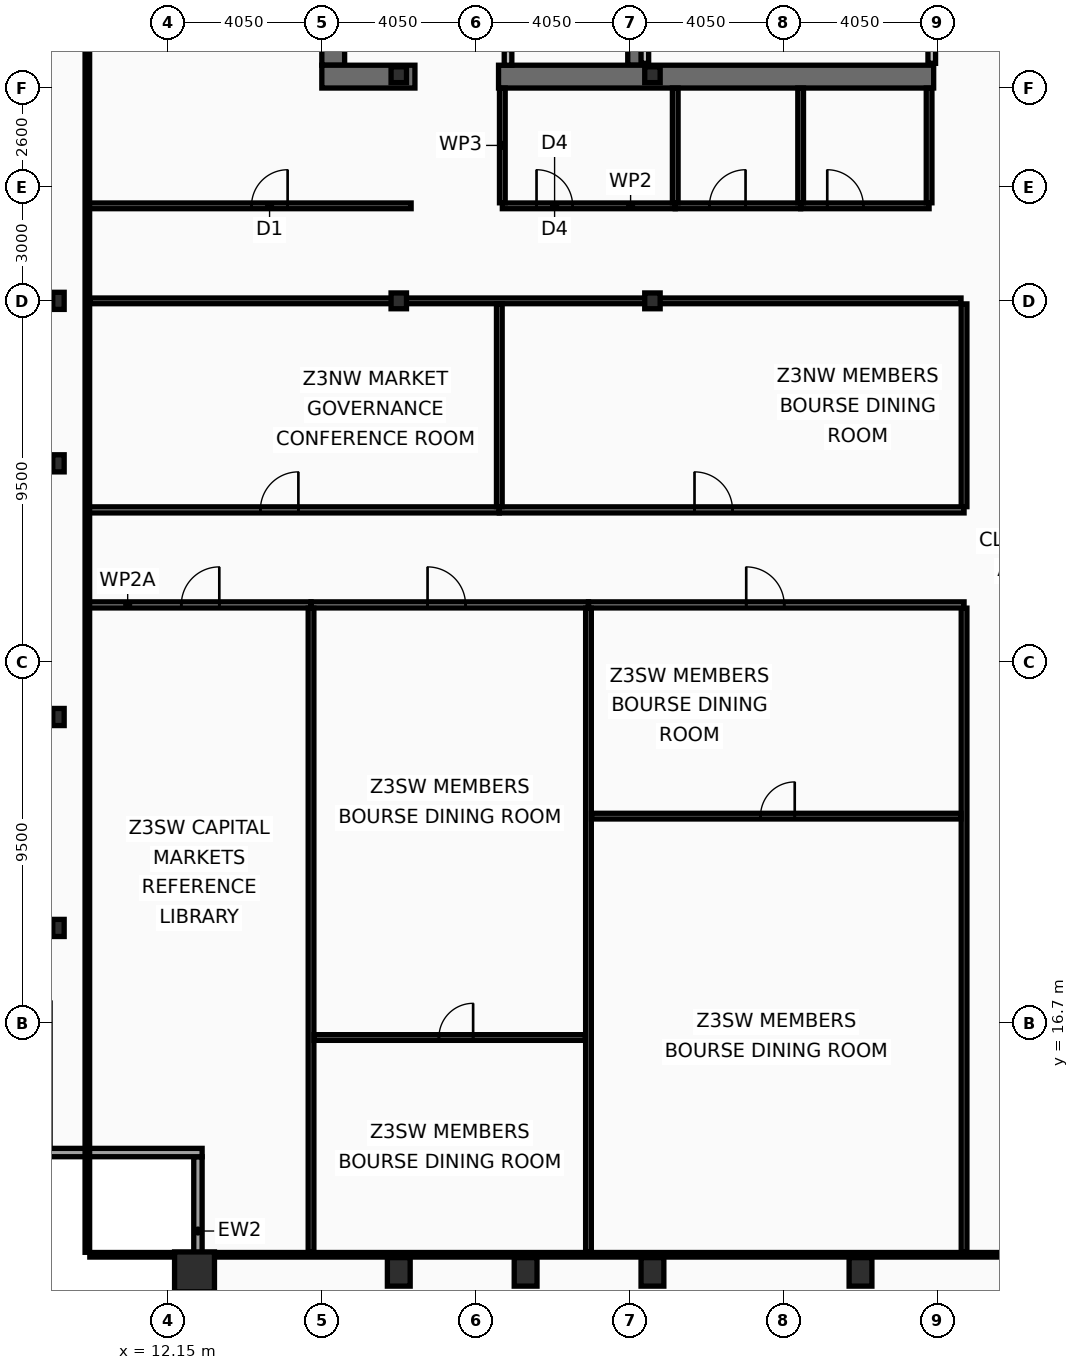
"""IFC4 building model, lengths in metres.
Left out: names, types, materials, properties, quantities, classifications, styles, units other than length and angle.
Written with IfcOpenShell. Run it as: python <this file> out.ifc"""

import sys

from ifc_helpers import new_model, si_unit, direction, frame, frame_2d, origin, origin_2d, place, context, subcontext, project, spatial, rectangle, hollow_rectangle, i_section, extrude, element, fill, save


model = new_model("IFC4")
c1 = context("Model", 3, precision=1e-05, world=origin(), true_north=direction((0.0, 1.0)))
c2 = subcontext(c1, "Body", "Model", "MODEL_VIEW")
j1 = project(units=[si_unit("LENGTHUNIT", "METRE"), si_unit("PLANEANGLEUNIT", "RADIAN")], contexts=[c1])
p1 = place(None, origin())
s1 = spatial("IfcSite", under=j1, at=p1, CompositionType="ELEMENT")
p2 = place(p1, origin())
s2 = spatial("IfcBuilding", under=s1, at=p2, CompositionType="ELEMENT")
p3 = place(p2, frame((0.0, 0.0, 242.6)))
s3 = spatial("IfcBuildingStorey", under=s2, at=p3, CompositionType="ELEMENT", Elevation=242.6)
p4 = place(p3, frame((16.5, 41.9, 0.0), z_axis=(0.0, 0.0, 1.0), x_axis=(0.0, 1.0, 0.0)))
e1 = element("IfcWall", 1, at=p4, inside=s3, PredefinedType="SHEAR", context=c2, shape_type="SweptSolid", body=[
    extrude(rectangle(XDim=11.2, YDim=0.6, at=frame_2d((5.6, 0.0))), origin(), (0.0, 0.0, 1.0), 3.44),
])
p5 = place(p3, frame((24.45, 41.9, 0.0), z_axis=(0.0, 0.0, 1.0), x_axis=(0.0, 1.0, 0.0)))
e2 = element("IfcWall", 2, at=p5, inside=s3, PredefinedType="SHEAR", context=c2, shape_type="SweptSolid", body=[
    extrude(rectangle(XDim=11.2, YDim=0.4, at=frame_2d((5.6, 0.0))), origin(), (0.0, 0.0, 1.0), 3.44),
])
p6 = place(p3, frame((18.65, 41.6, 0.0), z_axis=(0.0, 0.0, 1.0), x_axis=(-1.0, 0.0, 0.0)))
e3 = element("IfcWall", 3, at=p6, inside=s3, PredefinedType="SHEAR", context=c2, shape_type="SweptSolid", body=[
    extrude(rectangle(XDim=2.45, YDim=0.6, at=frame_2d((1.225, 0.0))), origin(), (0.0, 0.0, 1.0), 3.44),
])
p7 = place(p3, frame((32.3, 41.6, 0.0), z_axis=(0.0, 0.0, 1.0), x_axis=(-1.0, 0.0, 0.0)))
e4 = element("IfcWall", 4, at=p7, inside=s3, PredefinedType="SHEAR", context=c2, shape_type="SweptSolid", body=[
    extrude(rectangle(XDim=11.45, YDim=0.6, at=frame_2d((5.725, 0.0))), origin(), (0.0, 0.0, 1.0), 3.44),
])
p8 = place(p3, frame((12.85, 10.15, 0.0), z_axis=(0.0, 0.0, 1.0), x_axis=(1.0, 0.0, 0.0)))
e5 = element("IfcColumn", 5, at=p8, inside=s3, PredefinedType="COLUMN", context=c2, shape_type="SweptSolid", body=[
    extrude(hollow_rectangle(XDim=1.05, YDim=1.05, WallThickness=0.055, at=origin_2d()), origin(), (0.0, 0.0, 1.0), 3.6),
])
for number, where, z_axis, x_axis in (
    (6, (18.225, 10.15, 0.0), (0.0, 0.0, 1.0), (1.0, 0.0, 0.0)),
    (7, (21.562, 10.15, 0.0), (0.0, 0.0, 1.0), (1.0, 0.0, 0.0)),
    (8, (24.9, 10.15, 0.0), (0.0, 0.0, 1.0), (1.0, 0.0, 0.0)),
    (9, (30.375, 10.15, 0.0), (0.0, 0.0, 1.0), (1.0, 0.0, 0.0)),
):
    element("IfcColumn", number, at=place(p3, frame(where, z_axis=z_axis, x_axis=x_axis)), inside=s3, PredefinedType="COLUMN", context=c2, shape_type="SweptSolid", body=[
        extrude(hollow_rectangle(XDim=0.6, YDim=0.75, WallThickness=0.045, at=origin_2d()), origin(), (0.0, 0.0, 1.0), 3.6),
    ])
for number, where, z_axis, x_axis in (
    (10, (9.27, 19.2, 0.0), (0.0, 0.0, 1.0), (1.0, 0.0, 0.0)),
    (11, (9.27, 24.75, 0.0), (0.0, 0.0, 1.0), (1.0, 0.0, 0.0)),
    (12, (9.27, 31.425, 0.0), (0.0, 0.0, 1.0), (1.0, 0.0, 0.0)),
    (13, (9.27, 35.7, 0.0), (0.0, 0.0, 1.0), (1.0, 0.0, 0.0)),
):
    element("IfcColumn", number, at=place(p3, frame(where, z_axis=z_axis, x_axis=x_axis)), inside=s3, PredefinedType="COLUMN", context=c2, shape_type="SweptSolid", body=[
        extrude(i_section(OverallWidth=0.3, OverallDepth=0.45, WebThickness=0.014, FlangeThickness=0.026, at=origin_2d()), origin(), (0.0, 0.0, 1.0), 3.6),
    ])
for number, where, z_axis, x_axis in (
    (14, (18.225, 35.7, 0.0), (0.0, 0.0, 1.0), (1.0, 0.0, 0.0)),
    (15, (18.225, 41.65, 0.0), (0.0, 0.0, 1.0), (1.0, 0.0, 0.0)),
    (16, (24.9, 35.7, 0.0), (0.0, 0.0, 1.0), (1.0, 0.0, 0.0)),
    (17, (24.9, 41.65, 0.0), (0.0, 0.0, 1.0), (1.0, 0.0, 0.0)),
):
    element("IfcColumn", number, at=place(p3, frame(where, z_axis=z_axis, x_axis=x_axis)), inside=s3, PredefinedType="COLUMN", context=c2, shape_type="SweptSolid", body=[
        extrude(i_section(OverallWidth=0.406, OverallDepth=0.416, WebThickness=0.03, FlangeThickness=0.048, at=origin_2d()), origin(), (0.0, 0.0, 1.0), 3.6),
    ])
p9 = place(p3, frame((12.94, 9.27, 0.0), z_axis=(0.0, 0.0, 1.0), x_axis=(0.0, 1.0, 0.0)))
e18 = element("IfcWall", 18, at=p9, inside=s3, PredefinedType="SOLIDWALL", context=c2, shape_type="SweptSolid", body=[
    extrude(rectangle(XDim=3.91, YDim=0.22, at=frame_2d((1.955, 0.0))), origin(), (0.0, 0.0, 1.0), 2.83),
])
p10 = place(p3, frame((13.05, 13.29, 0.0), z_axis=(0.0, 0.0, 1.0), x_axis=(-1.0, 0.0, 0.0)))
e19 = element("IfcWall", 19, at=p10, inside=s3, PredefinedType="SOLIDWALL", context=c2, shape_type="SweptSolid", body=[
    extrude(rectangle(XDim=4.22, YDim=0.22, at=frame_2d((2.11, 0.0))), origin(), (0.0, 0.0, 1.0), 2.83),
])
p11 = place(p3, frame((21.1, 41.9, 0.0), z_axis=(0.0, 0.0, 1.0), x_axis=(0.0, 1.0, 0.0)))
e20 = element("IfcWall", 20, at=p11, inside=s3, PredefinedType="PARTITIONING", context=c2, shape_type="SweptSolid", body=[
    extrude(rectangle(XDim=2.595, YDim=0.2, at=frame_2d((1.298, 0.0))), origin(), (0.0, 0.0, 1.0), 3.44),
])
p12 = place(p11, frame((0.38, 0.0, 0.0)))
e21 = element("IfcOpeningElement", 21, at=p12, cuts=e20, PredefinedType="OPENING", context=c2, shape_type="SweptSolid", body=[
    extrude(rectangle(XDim=1.05, YDim=2.15, at=frame_2d((0.525, 1.075))), frame((0.0, 0.11, 0.0), z_axis=(0.0, -1.0, 0.0), x_axis=(1.0, 0.0, 0.0)), (0.0, 0.0, 1.0), 0.22),
])
for number, where, z_axis, x_axis in (
    (22, (24.7, 41.95, 0.0), (0.0, 0.0, 1.0), (0.0, 1.0, 0.0)),
    (23, (32.25, 41.95, 0.0), (0.0, 0.0, 1.0), (0.0, 1.0, 0.0)),
):
    element("IfcWall", number, at=place(p3, frame(where, z_axis=z_axis, x_axis=x_axis)), inside=s3, PredefinedType="PARTITIONING", context=c2, shape_type="SweptSolid", body=[
        extrude(rectangle(XDim=2.295, YDim=0.2, at=frame_2d((1.147, 0.0))), origin(), (0.0, 0.0, 1.0), 3.44),
    ])
p13 = place(p3, frame((20.95, 38.2, 0.0), z_axis=(0.0, 0.0, 1.0), x_axis=(1.0, 0.0, 0.0)))
e24 = element("IfcWall", 24, at=p13, inside=s3, PredefinedType="PARTITIONING", context=c2, shape_type="SweptSolid", body=[
    extrude(rectangle(XDim=4.55, YDim=0.15, at=frame_2d((2.275, 0.0))), origin(), (0.0, 0.0, 1.0), 2.78),
])
p14 = place(p13, frame((0.9, 0.0, 0.0)))
e25 = element("IfcOpeningElement", 25, at=p14, cuts=e24, PredefinedType="OPENING", context=c2, shape_type="SweptSolid", body=[
    extrude(rectangle(XDim=0.95, YDim=2.05, at=frame_2d((0.475, 1.025))), frame((0.0, 0.085, 0.0), z_axis=(0.0, -1.0, 0.0), x_axis=(1.0, 0.0, 0.0)), (0.0, 0.0, 1.0), 0.17),
])
p15 = place(p3, frame((25.5, 38.2, 0.0), z_axis=(0.0, 0.0, 1.0), x_axis=(1.0, 0.0, 0.0)))
e26 = element("IfcWall", 26, at=p15, inside=s3, PredefinedType="PARTITIONING", context=c2, shape_type="SweptSolid", body=[
    extrude(rectangle(XDim=3.3, YDim=0.15, at=frame_2d((1.65, 0.0))), origin(), (0.0, 0.0, 1.0), 3.44),
])
p16 = place(p15, frame((0.9, 0.0, 0.0)))
e27 = element("IfcOpeningElement", 27, at=p16, cuts=e26, PredefinedType="OPENING", context=c2, shape_type="SweptSolid", body=[
    extrude(rectangle(XDim=0.95, YDim=2.05, at=frame_2d((0.475, 1.025))), frame((0.0, 0.085, 0.0), z_axis=(0.0, -1.0, 0.0), x_axis=(1.0, 0.0, 0.0)), (0.0, 0.0, 1.0), 0.17),
])
p17 = place(p3, frame((28.8, 38.2, 0.0), z_axis=(0.0, 0.0, 1.0), x_axis=(1.0, 0.0, 0.0)))
e28 = element("IfcWall", 28, at=p17, inside=s3, PredefinedType="PARTITIONING", context=c2, shape_type="SweptSolid", body=[
    extrude(rectangle(XDim=3.38, YDim=0.15, at=frame_2d((1.69, 0.0))), origin(), (0.0, 0.0, 1.0), 2.78),
])
p18 = place(p17, frame((0.7, 0.0, 0.0)))
e29 = element("IfcOpeningElement", 29, at=p18, cuts=e28, PredefinedType="OPENING", context=c2, shape_type="SweptSolid", body=[
    extrude(rectangle(XDim=0.95, YDim=2.05, at=frame_2d((0.475, 1.025))), frame((0.0, 0.085, 0.0), z_axis=(0.0, -1.0, 0.0), x_axis=(1.0, 0.0, 0.0)), (0.0, 0.0, 1.0), 0.17),
])
for number, where, z_axis, x_axis in (
    (30, (20.95, 38.28, 0.0), (0.0, 0.0, 1.0), (0.0, 1.0, 0.0)),
    (31, (25.5, 38.28, 0.0), (0.0, 0.0, 1.0), (0.0, 1.0, 0.0)),
    (32, (28.8, 38.28, 0.0), (0.0, 0.0, 1.0), (0.0, 1.0, 0.0)),
    (33, (32.18, 38.28, 0.0), (0.0, 0.0, 1.0), (0.0, 1.0, 0.0)),
):
    element("IfcWall", number, at=place(p3, frame(where, z_axis=z_axis, x_axis=x_axis)), inside=s3, PredefinedType="PARTITIONING", context=c2, shape_type="SweptSolid", body=[
        extrude(rectangle(XDim=3.02, YDim=0.15, at=frame_2d((1.51, 0.0))), origin(), (0.0, 0.0, 1.0), 3.44),
    ])
p19 = place(p3, frame((10.03, 38.2, 0.0), z_axis=(0.0, 0.0, 1.0), x_axis=(1.0, 0.0, 0.0)))
e34 = element("IfcWall", 34, at=p19, inside=s3, PredefinedType="PARTITIONING", context=c2, shape_type="SweptSolid", body=[
    extrude(rectangle(XDim=8.52, YDim=0.15, at=frame_2d((4.26, 0.0))), origin(), (0.0, 0.0, 1.0), 2.78),
])
p20 = place(p19, frame((4.32, 0.0, 0.0)))
e35 = element("IfcOpeningElement", 35, at=p20, cuts=e34, PredefinedType="OPENING", context=c2, shape_type="SweptSolid", body=[
    extrude(rectangle(XDim=0.95, YDim=2.05, at=frame_2d((0.475, 1.025))), frame((0.0, 0.085, 0.0), z_axis=(0.0, -1.0, 0.0), x_axis=(1.0, 0.0, 0.0)), (0.0, 0.0, 1.0), 0.17),
])
p21 = place(p3, frame((33.1, 10.665, 0.0), z_axis=(0.0, 0.0, 1.0), x_axis=(0.0, 1.0, 0.0)))
e36 = element("IfcWall", 36, at=p21, inside=s3, PredefinedType="PARTITIONING", context=c2, shape_type="SweptSolid", body=[
    extrude(rectangle(XDim=16.95, YDim=0.15, at=frame_2d((8.475, 0.0))), origin(), (0.0, 0.0, 1.0), 2.98),
])
p22 = place(p3, frame((33.1, 30.285, 0.0), z_axis=(0.0, 0.0, 1.0), x_axis=(0.0, 1.0, 0.0)))
e37 = element("IfcWall", 37, at=p22, inside=s3, PredefinedType="PARTITIONING", context=c2, shape_type="SweptSolid", body=[
    extrude(rectangle(XDim=5.335, YDim=0.15, at=frame_2d((2.667, 0.0))), origin(), (0.0, 0.0, 1.0), 2.98),
])
p23 = place(p3, frame((10.095, 35.7, 0.0), z_axis=(0.0, 0.0, 1.0), x_axis=(1.0, 0.0, 0.0)))
e38 = element("IfcWall", 38, at=p23, inside=s3, PredefinedType="PARTITIONING", context=c2, shape_type="SweptSolid", body=[
    extrude(rectangle(XDim=22.925, YDim=0.15, at=frame_2d((11.462, 0.0))), origin(), (0.0, 0.0, 1.0), 2.78),
])
p24 = place(p3, frame((10.03, 27.7, 0.0), z_axis=(0.0, 0.0, 1.0), x_axis=(1.0, 0.0, 0.0)))
e39 = element("IfcWall", 39, at=p24, inside=s3, PredefinedType="PARTITIONING", context=c2, shape_type="SweptSolid", body=[
    extrude(rectangle(XDim=5.886, YDim=0.16, at=frame_2d((2.943, 0.0))), origin(), (0.0, 0.0, 1.0), 3.44),
])
p25 = place(p24, frame((2.472, 0.0, 0.0)))
e40 = element("IfcOpeningElement", 40, at=p25, cuts=e39, PredefinedType="OPENING", context=c2, shape_type="SweptSolid", body=[
    extrude(rectangle(XDim=1.0, YDim=2.05, at=frame_2d((0.5, 1.025))), frame((0.0, 0.09, 0.0), z_axis=(0.0, -1.0, 0.0), x_axis=(1.0, 0.0, 0.0)), (0.0, 0.0, 1.0), 0.18),
])
p26 = place(p3, frame((15.916, 27.7, 0.0), z_axis=(0.0, 0.0, 1.0), x_axis=(1.0, 0.0, 0.0)))
e41 = element("IfcWall", 41, at=p26, inside=s3, PredefinedType="PARTITIONING", context=c2, shape_type="SweptSolid", body=[
    extrude(rectangle(XDim=7.301, YDim=0.16, at=frame_2d((3.65, 0.0))), origin(), (0.0, 0.0, 1.0), 2.78),
])
p27 = place(p26, frame((3.066, 0.0, 0.0)))
e42 = element("IfcOpeningElement", 42, at=p27, cuts=e41, PredefinedType="OPENING", context=c2, shape_type="SweptSolid", body=[
    extrude(rectangle(XDim=1.0, YDim=2.05, at=frame_2d((0.5, 1.025))), frame((0.0, 0.09, 0.0), z_axis=(0.0, -1.0, 0.0), x_axis=(1.0, 0.0, 0.0)), (0.0, 0.0, 1.0), 0.18),
])
p28 = place(p3, frame((15.916, 10.665, 0.0), z_axis=(0.0, 0.0, 1.0), x_axis=(0.0, 1.0, 0.0)))
e43 = element("IfcWall", 43, at=p28, inside=s3, PredefinedType="PARTITIONING", context=c2, shape_type="SweptSolid", body=[
    extrude(rectangle(XDim=16.95, YDim=0.15, at=frame_2d((8.475, 0.0))), origin(), (0.0, 0.0, 1.0), 2.78),
])
p29 = place(p3, frame((15.996, 16.317, 0.0), z_axis=(0.0, 0.0, 1.0), x_axis=(1.0, 0.0, 0.0)))
e44 = element("IfcWall", 44, at=p29, inside=s3, PredefinedType="PARTITIONING", context=c2, shape_type="SweptSolid", body=[
    extrude(rectangle(XDim=7.141, YDim=0.15, at=frame_2d((3.57, 0.0))), origin(), (0.0, 0.0, 1.0), 2.78),
])
p30 = place(p29, frame((3.285, 0.0, 0.0)))
e45 = element("IfcOpeningElement", 45, at=p30, cuts=e44, PredefinedType="OPENING", context=c2, shape_type="SweptSolid", body=[
    extrude(rectangle(XDim=0.9, YDim=2.05, at=frame_2d((0.45, 1.025))), frame((0.0, 0.085, 0.0), z_axis=(0.0, -1.0, 0.0), x_axis=(1.0, 0.0, 0.0)), (0.0, 0.0, 1.0), 0.17),
])
p31 = place(p3, frame((23.217, 27.7, 0.0), z_axis=(0.0, 0.0, 1.0), x_axis=(1.0, 0.0, 0.0)))
e46 = element("IfcWall", 46, at=p31, inside=s3, PredefinedType="PARTITIONING", context=c2, shape_type="SweptSolid", body=[
    extrude(rectangle(XDim=9.883, YDim=0.16, at=frame_2d((4.942, 0.0))), origin(), (0.0, 0.0, 1.0), 2.78),
])
p32 = place(p31, frame((4.151, 0.0, 0.0)))
e47 = element("IfcOpeningElement", 47, at=p32, cuts=e46, PredefinedType="OPENING", context=c2, shape_type="SweptSolid", body=[
    extrude(rectangle(XDim=1.0, YDim=2.05, at=frame_2d((0.5, 1.025))), frame((0.0, 0.09, 0.0), z_axis=(0.0, -1.0, 0.0), x_axis=(1.0, 0.0, 0.0)), (0.0, 0.0, 1.0), 0.18),
])
p33 = place(p3, frame((23.217, 10.665, 0.0), z_axis=(0.0, 0.0, 1.0), x_axis=(0.0, 1.0, 0.0)))
e48 = element("IfcWall", 48, at=p33, inside=s3, PredefinedType="PARTITIONING", context=c2, shape_type="SweptSolid", body=[
    extrude(rectangle(XDim=16.95, YDim=0.15, at=frame_2d((8.475, 0.0))), origin(), (0.0, 0.0, 1.0), 2.98),
])
p34 = place(p3, frame((23.297, 22.142, 0.0), z_axis=(0.0, 0.0, 1.0), x_axis=(1.0, 0.0, 0.0)))
e49 = element("IfcWall", 49, at=p34, inside=s3, PredefinedType="PARTITIONING", context=c2, shape_type="SweptSolid", body=[
    extrude(rectangle(XDim=9.723, YDim=0.15, at=frame_2d((4.862, 0.0))), origin(), (0.0, 0.0, 1.0), 2.78),
])
p35 = place(p34, frame((4.448, 0.0, 0.0)))
e50 = element("IfcOpeningElement", 50, at=p35, cuts=e49, PredefinedType="OPENING", context=c2, shape_type="SweptSolid", body=[
    extrude(rectangle(XDim=0.9, YDim=2.05, at=frame_2d((0.45, 1.025))), frame((0.0, 0.085, 0.0), z_axis=(0.0, -1.0, 0.0), x_axis=(1.0, 0.0, 0.0)), (0.0, 0.0, 1.0), 0.17),
])
p36 = place(p3, frame((10.03, 30.2, 0.0), z_axis=(0.0, 0.0, 1.0), x_axis=(1.0, 0.0, 0.0)))
e51 = element("IfcWall", 51, at=p36, inside=s3, PredefinedType="PARTITIONING", context=c2, shape_type="SweptSolid", body=[
    extrude(rectangle(XDim=10.841, YDim=0.16, at=frame_2d((5.42, 0.0))), origin(), (0.0, 0.0, 1.0), 2.78),
])
p37 = place(p36, frame((4.553, 0.0, 0.0)))
e52 = element("IfcOpeningElement", 52, at=p37, cuts=e51, PredefinedType="OPENING", context=c2, shape_type="SweptSolid", body=[
    extrude(rectangle(XDim=1.0, YDim=2.05, at=frame_2d((0.5, 1.025))), frame((0.0, 0.09, 0.0), z_axis=(0.0, -1.0, 0.0), x_axis=(1.0, 0.0, 0.0)), (0.0, 0.0, 1.0), 0.18),
])
p38 = place(p3, frame((20.871, 30.2, 0.0), z_axis=(0.0, 0.0, 1.0), x_axis=(1.0, 0.0, 0.0)))
e53 = element("IfcWall", 53, at=p38, inside=s3, PredefinedType="PARTITIONING", context=c2, shape_type="SweptSolid", body=[
    extrude(rectangle(XDim=12.229, YDim=0.16, at=frame_2d((6.115, 0.0))), origin(), (0.0, 0.0, 1.0), 2.78),
])
p39 = place(p38, frame((5.136, 0.0, 0.0)))
e54 = element("IfcOpeningElement", 54, at=p39, cuts=e53, PredefinedType="OPENING", context=c2, shape_type="SweptSolid", body=[
    extrude(rectangle(XDim=1.0, YDim=2.05, at=frame_2d((0.5, 1.025))), frame((0.0, 0.09, 0.0), z_axis=(0.0, -1.0, 0.0), x_axis=(1.0, 0.0, 0.0)), (0.0, 0.0, 1.0), 0.18),
])
p40 = place(p3, frame((20.871, 30.285, 0.0), z_axis=(0.0, 0.0, 1.0), x_axis=(0.0, 1.0, 0.0)))
e55 = element("IfcWall", 55, at=p40, inside=s3, PredefinedType="PARTITIONING", context=c2, shape_type="SweptSolid", body=[
    extrude(rectangle(XDim=5.335, YDim=0.15, at=frame_2d((2.667, 0.0))), origin(), (0.0, 0.0, 1.0), 2.98),
])
p41 = place(p3, frame((10.03, 10.665, 0.0), z_axis=(0.0, 0.0, 1.0), x_axis=(0.0, 1.0, 0.0)))
e56 = element("IfcWall", 56, at=p41, inside=s3, PredefinedType="PARTITIONING", context=c2, shape_type="SweptSolid", body=[
    extrude(rectangle(XDim=42.11, YDim=0.12, at=frame_2d((21.055, 0.0))), origin(), (0.0, 0.0, 1.0), 2.78),
])
p42 = place(p3, frame((10.095, 10.6, 0.0), z_axis=(0.0, 0.0, 1.0), x_axis=(1.0, 0.0, 0.0)))
e57 = element("IfcWall", 57, at=p42, inside=s3, PredefinedType="PARTITIONING", context=c2, shape_type="SweptSolid", body=[
    extrude(rectangle(XDim=52.71, YDim=0.12, at=frame_2d((26.355, 0.0))), origin(), (0.0, 0.0, 1.0), 2.78),
])
p43 = place(p14, origin())
e58 = element("IfcDoor", 58, at=p43, inside=s3, OperationType="SINGLE_SWING_LEFT", PredefinedType="DOOR", context=c2, shape_type="SweptSolid", body=[
    extrude(rectangle(XDim=0.95, YDim=2.05, at=frame_2d((0.475, 1.025))), frame((0.0, 0.025, 0.0), z_axis=(0.0, -1.0, 0.0), x_axis=(1.0, 0.0, 0.0)), (0.0, 0.0, 1.0), 0.05),
])
fill(e25, e58)
p44 = place(p16, origin())
e59 = element("IfcDoor", 59, at=p44, inside=s3, OperationType="SINGLE_SWING_RIGHT", PredefinedType="DOOR", context=c2, shape_type="SweptSolid", body=[
    extrude(rectangle(XDim=0.95, YDim=2.05, at=frame_2d((0.475, 1.025))), frame((0.0, 0.025, 0.0), z_axis=(0.0, -1.0, 0.0), x_axis=(1.0, 0.0, 0.0)), (0.0, 0.0, 1.0), 0.05),
])
fill(e27, e59)
p45 = place(p18, origin())
e60 = element("IfcDoor", 60, at=p45, inside=s3, OperationType="SINGLE_SWING_LEFT", PredefinedType="DOOR", context=c2, shape_type="SweptSolid", body=[
    extrude(rectangle(XDim=0.95, YDim=2.05, at=frame_2d((0.475, 1.025))), frame((0.0, 0.025, 0.0), z_axis=(0.0, -1.0, 0.0), x_axis=(1.0, 0.0, 0.0)), (0.0, 0.0, 1.0), 0.05),
])
fill(e29, e60)
p46 = place(p20, origin())
e61 = element("IfcDoor", 61, at=p46, inside=s3, OperationType="SINGLE_SWING_RIGHT", PredefinedType="DOOR", context=c2, shape_type="SweptSolid", body=[
    extrude(rectangle(XDim=0.95, YDim=2.05, at=frame_2d((0.475, 1.025))), frame((0.0, 0.025, 0.0), z_axis=(0.0, -1.0, 0.0), x_axis=(1.0, 0.0, 0.0)), (0.0, 0.0, 1.0), 0.05),
])
fill(e35, e61)
p47 = place(p25, origin())
e62 = element("IfcDoor", 62, at=p47, inside=s3, OperationType="SINGLE_SWING_RIGHT", PredefinedType="DOOR", context=c2, shape_type="SweptSolid", body=[
    extrude(rectangle(XDim=1.0, YDim=2.05, at=frame_2d((0.5, 1.025))), frame((0.0, 0.025, 0.0), z_axis=(0.0, -1.0, 0.0), x_axis=(1.0, 0.0, 0.0)), (0.0, 0.0, 1.0), 0.05),
])
fill(e40, e62)
p48 = place(p27, origin())
e63 = element("IfcDoor", 63, at=p48, inside=s3, OperationType="SINGLE_SWING_LEFT", PredefinedType="DOOR", context=c2, shape_type="SweptSolid", body=[
    extrude(rectangle(XDim=1.0, YDim=2.05, at=frame_2d((0.5, 1.025))), frame((0.0, 0.025, 0.0), z_axis=(0.0, -1.0, 0.0), x_axis=(1.0, 0.0, 0.0)), (0.0, 0.0, 1.0), 0.05),
])
fill(e42, e63)
p49 = place(p30, origin())
e64 = element("IfcDoor", 64, at=p49, inside=s3, OperationType="SINGLE_SWING_RIGHT", PredefinedType="DOOR", context=c2, shape_type="SweptSolid", body=[
    extrude(rectangle(XDim=0.9, YDim=2.05, at=frame_2d((0.45, 1.025))), frame((0.0, 0.025, 0.0), z_axis=(0.0, -1.0, 0.0), x_axis=(1.0, 0.0, 0.0)), (0.0, 0.0, 1.0), 0.05),
])
fill(e45, e64)
p50 = place(p32, origin())
e65 = element("IfcDoor", 65, at=p50, inside=s3, OperationType="SINGLE_SWING_LEFT", PredefinedType="DOOR", context=c2, shape_type="SweptSolid", body=[
    extrude(rectangle(XDim=1.0, YDim=2.05, at=frame_2d((0.5, 1.025))), frame((0.0, 0.025, 0.0), z_axis=(0.0, -1.0, 0.0), x_axis=(1.0, 0.0, 0.0)), (0.0, 0.0, 1.0), 0.05),
])
fill(e47, e65)
p51 = place(p35, origin())
e66 = element("IfcDoor", 66, at=p51, inside=s3, OperationType="SINGLE_SWING_RIGHT", PredefinedType="DOOR", context=c2, shape_type="SweptSolid", body=[
    extrude(rectangle(XDim=0.9, YDim=2.05, at=frame_2d((0.45, 1.025))), frame((0.0, 0.025, 0.0), z_axis=(0.0, -1.0, 0.0), x_axis=(1.0, 0.0, 0.0)), (0.0, 0.0, 1.0), 0.05),
])
fill(e50, e66)
p52 = place(p37, origin())
e67 = element("IfcDoor", 67, at=p52, inside=s3, OperationType="SINGLE_SWING_RIGHT", PredefinedType="DOOR", context=c2, shape_type="SweptSolid", body=[
    extrude(rectangle(XDim=1.0, YDim=2.05, at=frame_2d((0.5, 1.025))), frame((0.0, 0.025, 0.0), z_axis=(0.0, -1.0, 0.0), x_axis=(1.0, 0.0, 0.0)), (0.0, 0.0, 1.0), 0.05),
])
fill(e52, e67)
p53 = place(p39, origin())
e68 = element("IfcDoor", 68, at=p53, inside=s3, OperationType="SINGLE_SWING_LEFT", PredefinedType="DOOR", context=c2, shape_type="SweptSolid", body=[
    extrude(rectangle(XDim=1.0, YDim=2.05, at=frame_2d((0.5, 1.025))), frame((0.0, 0.025, 0.0), z_axis=(0.0, -1.0, 0.0), x_axis=(1.0, 0.0, 0.0)), (0.0, 0.0, 1.0), 0.05),
])
fill(e54, e68)
save(model, sys.argv[1])
